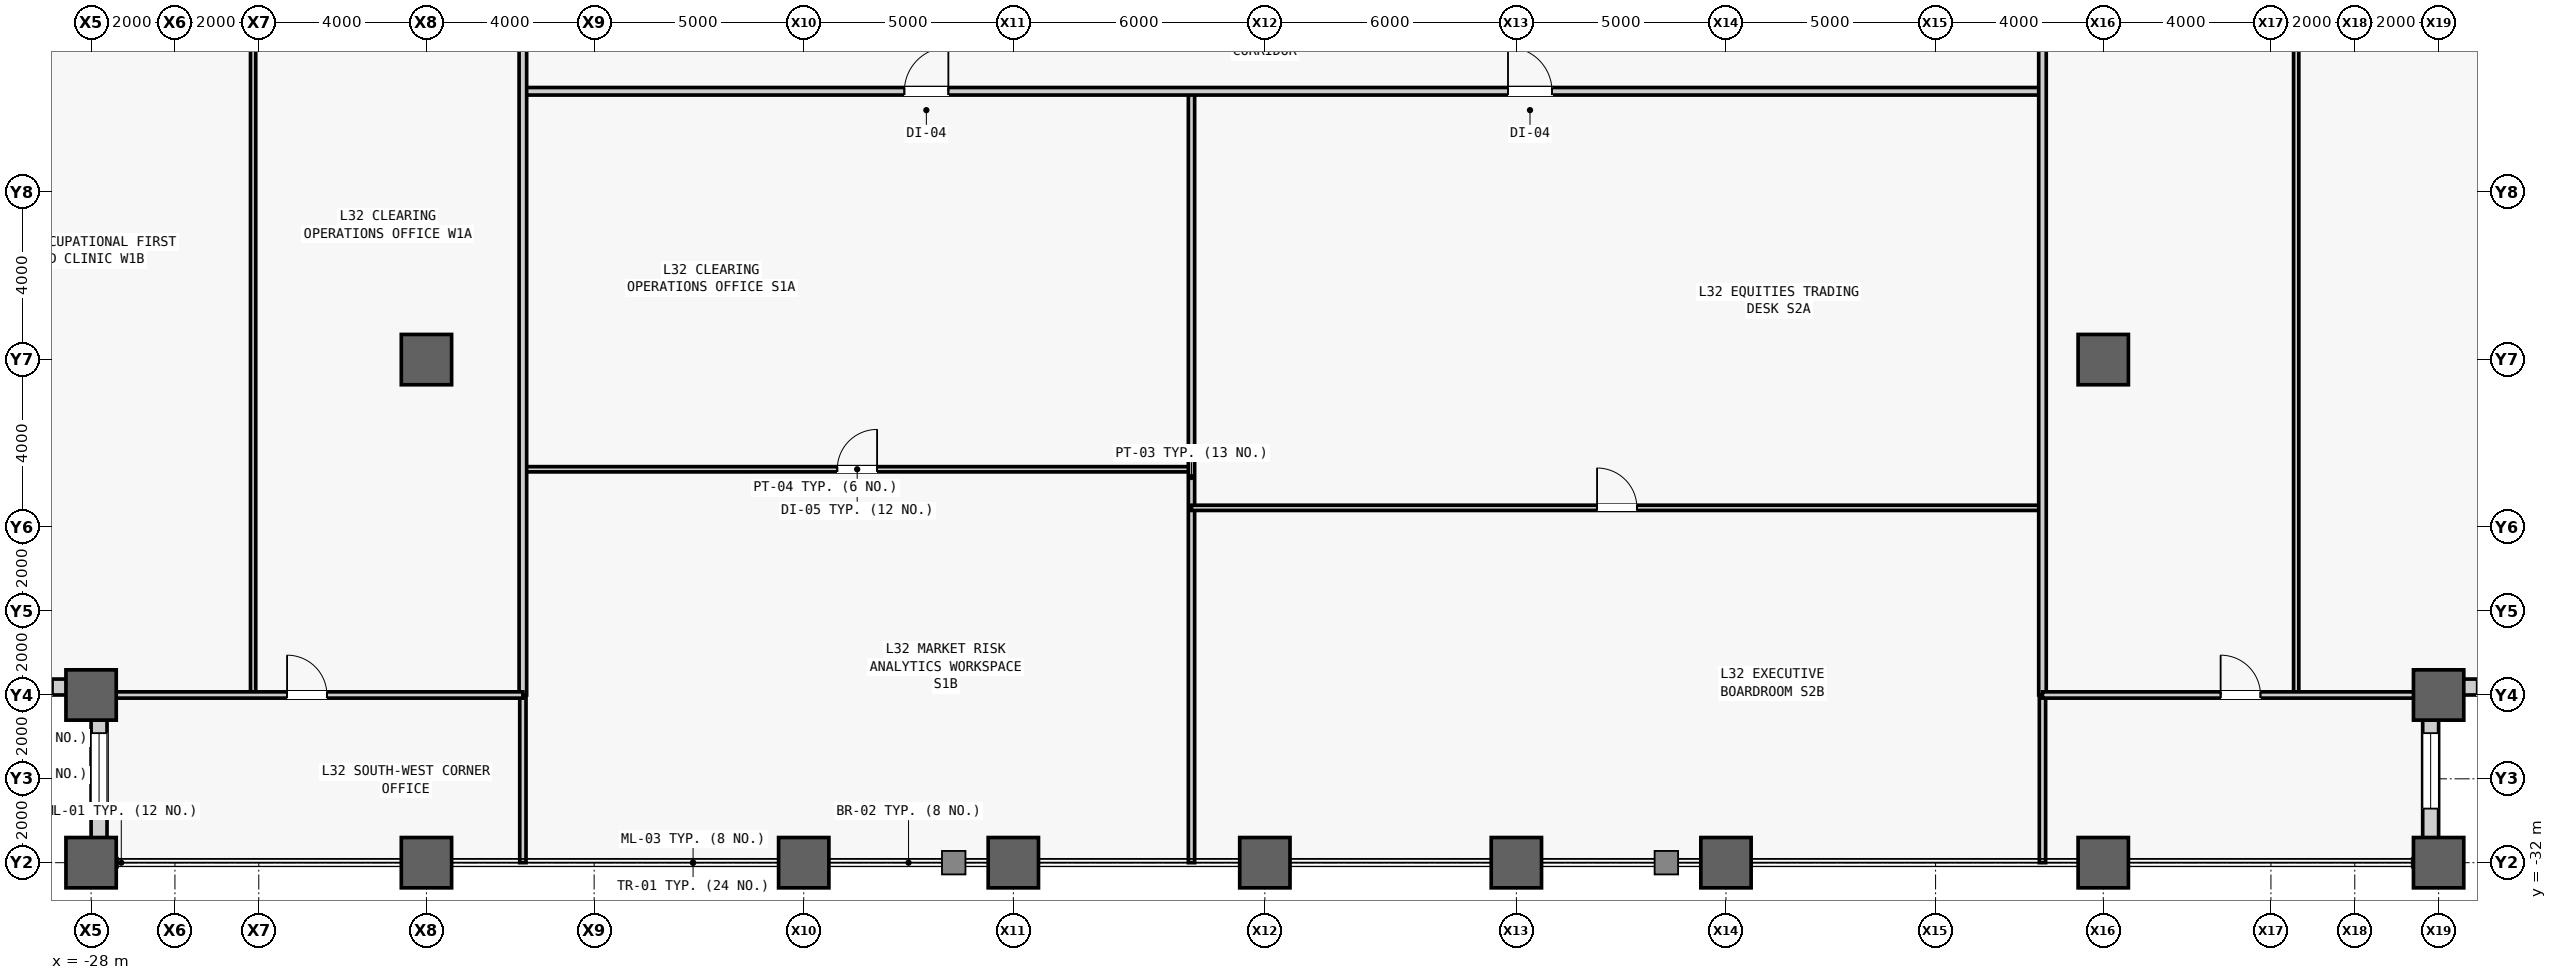
"""IFC4 building model, lengths in metres.
Left out: names, types, materials, properties, quantities, classifications, styles, units other than length and angle.
Written with IfcOpenShell. Run it as: python <this file> out.ifc"""

import sys

from ifc_helpers import new_model, si_unit, direction, frame, frame_2d, origin, origin_2d, place, context, subcontext, project, spatial, rectangle, hollow_rectangle, extrude, source, transform, mapped, element, fill, save


model = new_model("IFC4")
c1 = context("Model", 3, precision=1e-05, world=origin(), true_north=direction((0.0, 1.0)))
c2 = subcontext(c1, "Body", "Model", "MODEL_VIEW")
j1 = project(units=[si_unit("LENGTHUNIT", "METRE"), si_unit("PLANEANGLEUNIT", "RADIAN")], contexts=[c1])
p1 = place(None, origin())
s1 = spatial("IfcSite", under=j1, at=p1, CompositionType="ELEMENT")
p2 = place(p1, origin())
s2 = spatial("IfcBuilding", under=s1, at=p2, CompositionType="ELEMENT")
p3 = place(p2, frame((0.0, 0.0, 140.6)))
s3 = spatial("IfcBuildingStorey", under=s2, at=p3, CompositionType="ELEMENT", Elevation=140.6)
m1 = source(origin(), c2, "Body", "SweptSolid", [
    extrude(hollow_rectangle(XDim=1.2, YDim=1.2, WallThickness=0.07, at=origin_2d()), origin(), (0.0, 0.0, 1.0), 4.1),
])
for number, where, z_axis, x_axis in (
    (1, (-28.0, -32.0, 0.0), (0.0, 0.0, 1.0), (1.0, 0.0, 0.0)),
    (2, (-28.0, -28.0, 0.0), (0.0, 0.0, 1.0), (1.0, 0.0, 0.0)),
    (3, (-20.0, -32.0, 0.0), (0.0, 0.0, 1.0), (1.0, 0.0, 0.0)),
    (4, (-20.0, -20.0, 0.0), (0.0, 0.0, 1.0), (1.0, 0.0, 0.0)),
    (5, (-11.0, -32.0, 0.0), (0.0, 0.0, 1.0), (1.0, 0.0, 0.0)),
    (6, (-6.0, -32.0, 0.0), (0.0, 0.0, 1.0), (1.0, 0.0, 0.0)),
    (7, (0.0, -32.0, 0.0), (0.0, 0.0, 1.0), (1.0, 0.0, 0.0)),
    (8, (6.0, -32.0, 0.0), (0.0, 0.0, 1.0), (1.0, 0.0, 0.0)),
    (9, (11.0, -32.0, 0.0), (0.0, 0.0, 1.0), (1.0, 0.0, 0.0)),
    (10, (20.0, -32.0, 0.0), (0.0, 0.0, 1.0), (1.0, 0.0, 0.0)),
    (11, (20.0, -20.0, 0.0), (0.0, 0.0, 1.0), (1.0, 0.0, 0.0)),
    (12, (28.0, -32.0, 0.0), (0.0, 0.0, 1.0), (1.0, 0.0, 0.0)),
    (13, (28.0, -28.0, 0.0), (0.0, 0.0, 1.0), (1.0, 0.0, 0.0)),
):
    element("IfcColumn", number, at=place(p3, frame(where, z_axis=z_axis, x_axis=x_axis)), inside=s3, PredefinedType="COLUMN", context=c2, shape_type="MappedRepresentation", body=[
        mapped(m1, transform((0.0, 0.0, 0.0), scale=1.0)),
    ])
m2 = source(origin(), c2, "Body", "SweptSolid", [
    extrude(rectangle(XDim=3.62, YDim=0.38, at=frame_2d((1.81, 0.0))), origin(), (0.0, 0.0, 1.0), 3.145),
])
p4 = place(p3, frame((-28.0, -27.81, 0.0), z_axis=(0.0, 0.0, 1.0), x_axis=(-1.0, 0.0, 0.0)))
e14 = element("IfcWall", 14, at=p4, inside=s3, PredefinedType="STANDARD", context=c2, shape_type="MappedRepresentation", body=[
    mapped(m2, transform((0.0, 0.0, 0.0), scale=1.0)),
])
m3 = source(origin(), c2, "Body", "SweptSolid", [
    extrude(rectangle(XDim=1.8, YDim=2.4, at=frame_2d((0.9, 1.2))), frame((0.0, 0.2, 0.0), z_axis=(0.0, -1.0, 0.0), x_axis=(1.0, 0.0, 0.0)), (0.0, 0.0, 1.0), 0.4),
])
p5 = place(p4, frame((0.91, 0.0, 0.5)))
e15 = element("IfcOpeningElement", 15, at=p5, cuts=e14, PredefinedType="OPENING", context=c2, shape_type="MappedRepresentation", body=[
    mapped(m3, transform((0.0, 0.0, 0.0), scale=1.0)),
])
p6 = place(p3, frame((-27.81, -31.62, 0.0), z_axis=(0.0, 0.0, 1.0), x_axis=(0.0, 1.0, 0.0)))
e16 = element("IfcWall", 16, at=p6, inside=s3, PredefinedType="STANDARD", context=c2, shape_type="MappedRepresentation", body=[
    mapped(m2, transform((0.0, 0.0, 0.0), scale=1.0)),
])
p7 = place(p6, frame((0.91, 0.0, 0.5)))
e17 = element("IfcOpeningElement", 17, at=p7, cuts=e16, PredefinedType="OPENING", context=c2, shape_type="MappedRepresentation", body=[
    mapped(m3, transform((0.0, 0.0, 0.0), scale=1.0)),
])
p8 = place(p3, frame((27.81, -31.62, 0.0), z_axis=(0.0, 0.0, 1.0), x_axis=(0.0, 1.0, 0.0)))
e18 = element("IfcWall", 18, at=p8, inside=s3, PredefinedType="STANDARD", context=c2, shape_type="MappedRepresentation", body=[
    mapped(m2, transform((0.0, 0.0, 0.0), scale=1.0)),
])
p9 = place(p8, frame((0.91, 0.0, 0.5)))
e19 = element("IfcOpeningElement", 19, at=p9, cuts=e18, PredefinedType="OPENING", context=c2, shape_type="MappedRepresentation", body=[
    mapped(m3, transform((0.0, 0.0, 0.0), scale=1.0)),
])
p10 = place(p3, frame((28.0, -27.81, 0.0), z_axis=(0.0, 0.0, 1.0), x_axis=(1.0, 0.0, 0.0)))
e20 = element("IfcWall", 20, at=p10, inside=s3, PredefinedType="STANDARD", context=c2, shape_type="MappedRepresentation", body=[
    mapped(m2, transform((0.0, 0.0, 0.0), scale=1.0)),
])
p11 = place(p10, frame((0.91, 0.0, 0.5)))
e21 = element("IfcOpeningElement", 21, at=p11, cuts=e20, PredefinedType="OPENING", context=c2, shape_type="MappedRepresentation", body=[
    mapped(m3, transform((0.0, 0.0, 0.0), scale=1.0)),
])
m4 = source(origin(), c2, "Body", "SweptSolid", [
    extrude(rectangle(XDim=15.95, YDim=0.125, at=frame_2d((7.975, 0.0))), origin(), (0.0, 0.0, 1.0), 3.84),
])
p12 = place(p3, frame((-17.7, -22.616, 0.0), z_axis=(0.0, 0.0, 1.0), x_axis=(1.0, 0.0, 0.0)))
e22 = element("IfcWall", 22, at=p12, inside=s3, PredefinedType="PARTITIONING", context=c2, shape_type="MappedRepresentation", body=[
    mapped(m4, transform((0.0, 0.0, 0.0), scale=1.0)),
])
m5 = source(origin(), c2, "Body", "SweptSolid", [
    extrude(rectangle(XDim=0.95, YDim=2.15, at=frame_2d((0.475, 1.075))), frame((0.0, 0.073, 0.0), z_axis=(0.0, -1.0, 0.0), x_axis=(1.0, 0.0, 0.0)), (0.0, 0.0, 1.0), 0.145),
])
p13 = place(p12, frame((7.5, 0.0, 0.0)))
e23 = element("IfcOpeningElement", 23, at=p13, cuts=e22, PredefinedType="OPENING", context=c2, shape_type="MappedRepresentation", body=[
    mapped(m5, transform((0.0, 0.0, 0.0), scale=1.0)),
])
m6 = source(origin(), c2, "Body", "SweptSolid", [
    extrude(rectangle(XDim=18.4, YDim=0.15, at=frame_2d((9.2, 0.0))), origin(), (0.0, 0.0, 1.0), 3.84),
])
p14 = place(p3, frame((-1.75, -32.0, 0.0), z_axis=(0.0, 0.0, 1.0), x_axis=(0.0, 1.0, 0.0)))
e24 = element("IfcWall", 24, at=p14, inside=s3, PredefinedType="PARTITIONING", context=c2, shape_type="MappedRepresentation", body=[
    mapped(m6, transform((0.0, 0.0, 0.0), scale=1.0)),
])
m7 = source(origin(), c2, "Body", "SweptSolid", [
    extrude(rectangle(XDim=20.3, YDim=0.125, at=frame_2d((10.15, 0.0))), origin(), (0.0, 0.0, 1.0), 3.84),
])
p15 = place(p3, frame((-1.75, -23.536, 0.0), z_axis=(0.0, 0.0, 1.0), x_axis=(1.0, 0.0, 0.0)))
e25 = element("IfcWall", 25, at=p15, inside=s3, PredefinedType="PARTITIONING", context=c2, shape_type="MappedRepresentation", body=[
    mapped(m7, transform((0.0, 0.0, 0.0), scale=1.0)),
])
p16 = place(p15, frame((9.675, 0.0, 0.0)))
e26 = element("IfcOpeningElement", 26, at=p16, cuts=e25, PredefinedType="OPENING", context=c2, shape_type="MappedRepresentation", body=[
    mapped(m5, transform((0.0, 0.0, 0.0), scale=1.0)),
])
m8 = source(origin(), c2, "Body", "SweptSolid", [
    extrude(rectangle(XDim=36.25, YDim=0.18, at=frame_2d((18.125, 0.0))), origin(), (0.0, 0.0, 1.0), 3.84),
])
p17 = place(p3, frame((-17.7, -13.6, 0.0), z_axis=(0.0, 0.0, 1.0), x_axis=(1.0, 0.0, 0.0)))
e27 = element("IfcWall", 27, at=p17, inside=s3, PredefinedType="PARTITIONING", context=c2, shape_type="MappedRepresentation", body=[
    mapped(m8, transform((0.0, 0.0, 0.0), scale=1.0)),
])
m9 = source(origin(), c2, "Body", "SweptSolid", [
    extrude(rectangle(XDim=1.05, YDim=2.2, at=frame_2d((0.525, 1.1))), frame((0.0, 0.1, 0.0), z_axis=(0.0, -1.0, 0.0), x_axis=(1.0, 0.0, 0.0)), (0.0, 0.0, 1.0), 0.2),
])
p18 = place(p17, frame((9.1, 0.0, 0.0)))
e28 = element("IfcOpeningElement", 28, at=p18, cuts=e27, PredefinedType="OPENING", context=c2, shape_type="MappedRepresentation", body=[
    mapped(m9, transform((0.0, 0.0, 0.0), scale=1.0)),
])
p19 = place(p17, frame((23.5, 0.0, 0.0)))
e29 = element("IfcOpeningElement", 29, at=p19, cuts=e27, PredefinedType="OPENING", context=c2, shape_type="MappedRepresentation", body=[
    mapped(m9, transform((0.0, 0.0, 0.0), scale=1.0)),
])
m10 = source(origin(), c2, "Body", "SweptSolid", [
    extrude(rectangle(XDim=4.0, YDim=0.15, at=frame_2d((2.0, 0.0))), origin(), (0.0, 0.0, 1.0), 3.84),
])
for number, where, z_axis, x_axis in (
    (30, (-17.7, -32.0, 0.0), (0.0, 0.0, 1.0), (0.0, 1.0, 0.0)),
    (31, (18.55, -32.0, 0.0), (0.0, 0.0, 1.0), (0.0, 1.0, 0.0)),
):
    element("IfcWall", number, at=place(p3, frame(where, z_axis=z_axis, x_axis=x_axis)), inside=s3, PredefinedType="PARTITIONING", context=c2, shape_type="MappedRepresentation", body=[
        mapped(m10, transform((0.0, 0.0, 0.0), scale=1.0)),
    ])
m11 = source(origin(), c2, "Body", "SweptSolid", [
    extrude(rectangle(XDim=29.088, YDim=0.125, at=frame_2d((14.544, 0.0))), origin(), (0.0, 0.0, 1.0), 3.84),
])
p20 = place(p3, frame((-24.135, -28.0, 0.0), z_axis=(0.0, 0.0, 1.0), x_axis=(0.0, 1.0, 0.0)))
e32 = element("IfcWall", 32, at=p20, inside=s3, PredefinedType="PARTITIONING", context=c2, shape_type="MappedRepresentation", body=[
    mapped(m11, transform((0.0, 0.0, 0.0), scale=1.0)),
])
p21 = place(p20, frame((21.269, 0.0, 0.0)))
e33 = element("IfcOpeningElement", 33, at=p21, cuts=e32, PredefinedType="OPENING", context=c2, shape_type="MappedRepresentation", body=[
    mapped(m5, transform((0.0, 0.0, 0.0), scale=1.0)),
])
m12 = source(origin(), c2, "Body", "SweptSolid", [
    extrude(rectangle(XDim=56.0, YDim=0.18, at=frame_2d((28.0, 0.0))), origin(), (0.0, 0.0, 1.0), 3.84),
])
p22 = place(p3, frame((-17.7, -28.0, 0.0), z_axis=(0.0, 0.0, 1.0), x_axis=(0.0, 1.0, 0.0)))
e34 = element("IfcWall", 34, at=p22, inside=s3, PredefinedType="PARTITIONING", context=c2, shape_type="MappedRepresentation", body=[
    mapped(m12, transform((0.0, 0.0, 0.0), scale=1.0)),
])
m13 = source(origin(), c2, "Body", "SweptSolid", [
    extrude(rectangle(XDim=0.95, YDim=2.15, at=frame_2d((0.475, 1.075))), frame((0.0, 0.1, 0.0), z_axis=(0.0, -1.0, 0.0), x_axis=(1.0, 0.0, 0.0)), (0.0, 0.0, 1.0), 0.2),
])
p23 = place(p22, frame((21.569, 0.0, 0.0)))
e35 = element("IfcOpeningElement", 35, at=p23, cuts=e34, PredefinedType="OPENING", context=c2, shape_type="MappedRepresentation", body=[
    mapped(m13, transform((0.0, 0.0, 0.0), scale=1.0)),
])
p24 = place(p22, frame((34.569, 0.0, 0.0)))
e36 = element("IfcOpeningElement", 36, at=p24, cuts=e34, PredefinedType="OPENING", context=c2, shape_type="MappedRepresentation", body=[
    mapped(m13, transform((0.0, 0.0, 0.0), scale=1.0)),
])
m14 = source(origin(), c2, "Body", "SweptSolid", [
    extrude(rectangle(XDim=56.0, YDim=0.125, at=frame_2d((28.0, 0.0))), origin(), (0.0, 0.0, 1.0), 3.84),
])
p25 = place(p3, frame((24.603, -28.0, 0.0), z_axis=(0.0, 0.0, 1.0), x_axis=(0.0, 1.0, 0.0)))
e37 = element("IfcWall", 37, at=p25, inside=s3, PredefinedType="PARTITIONING", context=c2, shape_type="MappedRepresentation", body=[
    mapped(m14, transform((0.0, 0.0, 0.0), scale=1.0)),
])
p26 = place(p25, frame((27.525, 0.0, 0.0)))
e38 = element("IfcOpeningElement", 38, at=p26, cuts=e37, PredefinedType="OPENING", context=c2, shape_type="MappedRepresentation", body=[
    mapped(m5, transform((0.0, 0.0, 0.0), scale=1.0)),
])
p27 = place(p3, frame((18.55, -28.0, 0.0), z_axis=(0.0, 0.0, 1.0), x_axis=(0.0, 1.0, 0.0)))
e39 = element("IfcWall", 39, at=p27, inside=s3, PredefinedType="PARTITIONING", context=c2, shape_type="MappedRepresentation", body=[
    mapped(m12, transform((0.0, 0.0, 0.0), scale=1.0)),
])
p28 = place(p27, frame((27.525, 0.0, 0.0)))
e40 = element("IfcOpeningElement", 40, at=p28, cuts=e39, PredefinedType="OPENING", context=c2, shape_type="MappedRepresentation", body=[
    mapped(m13, transform((0.0, 0.0, 0.0), scale=1.0)),
])
m15 = source(origin(), c2, "Body", "SweptSolid", [
    extrude(rectangle(XDim=10.3, YDim=0.15, at=frame_2d((5.15, 0.0))), origin(), (0.0, 0.0, 1.0), 3.84),
])
p29 = place(p3, frame((-28.0, -28.0, 0.0), z_axis=(0.0, 0.0, 1.0), x_axis=(1.0, 0.0, 0.0)))
e41 = element("IfcWall", 41, at=p29, inside=s3, PredefinedType="PARTITIONING", context=c2, shape_type="MappedRepresentation", body=[
    mapped(m15, transform((0.0, 0.0, 0.0), scale=1.0)),
])
m16 = source(origin(), c2, "Body", "SweptSolid", [
    extrude(rectangle(XDim=0.95, YDim=2.15, at=frame_2d((0.475, 1.075))), frame((0.0, 0.085, 0.0), z_axis=(0.0, -1.0, 0.0), x_axis=(1.0, 0.0, 0.0)), (0.0, 0.0, 1.0), 0.17),
])
p30 = place(p29, frame((4.675, 0.0, 0.0)))
e42 = element("IfcOpeningElement", 42, at=p30, cuts=e41, PredefinedType="OPENING", context=c2, shape_type="MappedRepresentation", body=[
    mapped(m16, transform((0.0, 0.0, 0.0), scale=1.0)),
])
m17 = source(origin(), c2, "Body", "SweptSolid", [
    extrude(rectangle(XDim=9.45, YDim=0.15, at=frame_2d((4.725, 0.0))), origin(), (0.0, 0.0, 1.0), 3.84),
])
p31 = place(p3, frame((18.55, -28.0, 0.0), z_axis=(0.0, 0.0, 1.0), x_axis=(1.0, 0.0, 0.0)))
e43 = element("IfcWall", 43, at=p31, inside=s3, PredefinedType="PARTITIONING", context=c2, shape_type="MappedRepresentation", body=[
    mapped(m17, transform((0.0, 0.0, 0.0), scale=1.0)),
])
p32 = place(p31, frame((4.25, 0.0, 0.0)))
e44 = element("IfcOpeningElement", 44, at=p32, cuts=e43, PredefinedType="OPENING", context=c2, shape_type="MappedRepresentation", body=[
    mapped(m16, transform((0.0, 0.0, 0.0), scale=1.0)),
])
m18 = source(origin(), c2, "Body", "SweptSolid", [
    extrude(rectangle(XDim=1.8, YDim=2.4, at=frame_2d((0.9, 1.2))), frame((0.0, 0.03, 0.0), z_axis=(0.0, -1.0, 0.0), x_axis=(1.0, 0.0, 0.0)), (0.0, 0.0, 1.0), 0.06),
])
p33 = place(p5, origin())
e45 = element("IfcWindow", 45, at=p33, inside=s3, PartitioningType="SINGLE_PANEL", PredefinedType="WINDOW", context=c2, shape_type="MappedRepresentation", body=[
    mapped(m18, transform((0.0, 0.0, 0.0), scale=1.0)),
])
fill(e15, e45)
p34 = place(p7, origin())
e46 = element("IfcWindow", 46, at=p34, inside=s3, PartitioningType="SINGLE_PANEL", PredefinedType="WINDOW", context=c2, shape_type="MappedRepresentation", body=[
    mapped(m18, transform((0.0, 0.0, 0.0), scale=1.0)),
])
fill(e17, e46)
p35 = place(p9, origin())
e47 = element("IfcWindow", 47, at=p35, inside=s3, PartitioningType="SINGLE_PANEL", PredefinedType="WINDOW", context=c2, shape_type="MappedRepresentation", body=[
    mapped(m18, transform((0.0, 0.0, 0.0), scale=1.0)),
])
fill(e19, e47)
p36 = place(p11, origin())
e48 = element("IfcWindow", 48, at=p36, inside=s3, PartitioningType="SINGLE_PANEL", PredefinedType="WINDOW", context=c2, shape_type="MappedRepresentation", body=[
    mapped(m18, transform((0.0, 0.0, 0.0), scale=1.0)),
])
fill(e21, e48)
m19 = source(origin(), c2, "Body", "SweptSolid", [
    extrude(rectangle(XDim=0.95, YDim=2.15, at=frame_2d((0.475, 1.075))), frame((0.0, 0.025, 0.0), z_axis=(0.0, -1.0, 0.0), x_axis=(1.0, 0.0, 0.0)), (0.0, 0.0, 1.0), 0.05),
])
p37 = place(p13, origin())
e49 = element("IfcDoor", 49, at=p37, inside=s3, OperationType="SINGLE_SWING_RIGHT", PredefinedType="DOOR", context=c2, shape_type="MappedRepresentation", body=[
    mapped(m19, transform((0.0, 0.0, 0.0), scale=1.0)),
])
fill(e23, e49)
p38 = place(p16, origin())
e50 = element("IfcDoor", 50, at=p38, inside=s3, OperationType="SINGLE_SWING_LEFT", PredefinedType="DOOR", context=c2, shape_type="MappedRepresentation", body=[
    mapped(m19, transform((0.0, 0.0, 0.0), scale=1.0)),
])
fill(e26, e50)
m20 = source(origin(), c2, "Body", "SweptSolid", [
    extrude(rectangle(XDim=1.05, YDim=2.2, at=frame_2d((0.525, 1.1))), frame((0.0, 0.025, 0.0), z_axis=(0.0, -1.0, 0.0), x_axis=(1.0, 0.0, 0.0)), (0.0, 0.0, 1.0), 0.05),
])
p39 = place(p18, origin())
e51 = element("IfcDoor", 51, at=p39, inside=s3, OperationType="SINGLE_SWING_RIGHT", PredefinedType="DOOR", context=c2, shape_type="MappedRepresentation", body=[
    mapped(m20, transform((0.0, 0.0, 0.0), scale=1.0)),
])
fill(e28, e51)
p40 = place(p19, origin())
e52 = element("IfcDoor", 52, at=p40, inside=s3, OperationType="SINGLE_SWING_LEFT", PredefinedType="DOOR", context=c2, shape_type="MappedRepresentation", body=[
    mapped(m20, transform((0.0, 0.0, 0.0), scale=1.0)),
])
fill(e29, e52)
p41 = place(p30, origin())
e53 = element("IfcDoor", 53, at=p41, inside=s3, OperationType="SINGLE_SWING_LEFT", PredefinedType="DOOR", context=c2, shape_type="MappedRepresentation", body=[
    mapped(m19, transform((0.0, 0.0, 0.0), scale=1.0)),
])
fill(e42, e53)
p42 = place(p32, origin())
e54 = element("IfcDoor", 54, at=p42, inside=s3, OperationType="SINGLE_SWING_LEFT", PredefinedType="DOOR", context=c2, shape_type="MappedRepresentation", body=[
    mapped(m19, transform((0.0, 0.0, 0.0), scale=1.0)),
])
fill(e44, e54)
save(model, sys.argv[1])
